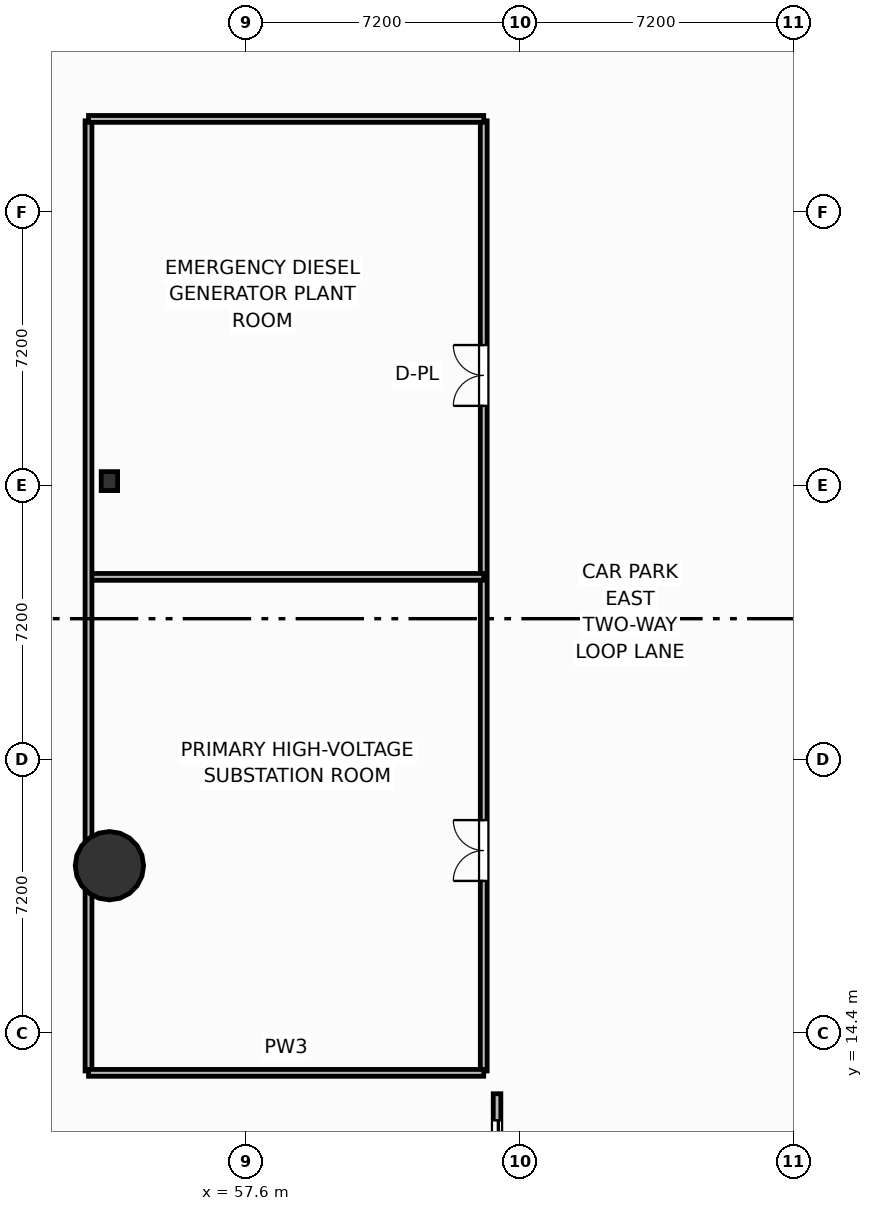
"""IFC4 building model, lengths in metres.
Left out: names, types, materials, properties, quantities, classifications, styles, units other than length and angle.
Written with IfcOpenShell. Run it as: python <this file> out.ifc"""

import sys

from ifc_helpers import new_model, si_unit, direction, frame, frame_2d, origin, origin_2d, place, context, subcontext, project, spatial, rectangle, circle, i_section, extrude, element, fill, save


model = new_model("IFC4")
c1 = context("Model", 3, precision=1e-05, world=origin(), true_north=direction((0.0, 1.0)))
c2 = subcontext(c1, "Body", "Model", "MODEL_VIEW")
j1 = project(units=[si_unit("LENGTHUNIT", "METRE"), si_unit("PLANEANGLEUNIT", "RADIAN")], contexts=[c1])
p1 = place(None, origin())
s1 = spatial("IfcSite", under=j1, at=p1, CompositionType="ELEMENT")
p2 = place(p1, origin())
s2 = spatial("IfcBuilding", under=s1, at=p2, CompositionType="ELEMENT")
p3 = place(p2, frame((0.0, 0.0, -4.5)))
s3 = spatial("IfcBuildingStorey", under=s2, at=p3, CompositionType="ELEMENT", Elevation=-4.5)
p4 = place(p3, frame((54.0, 28.92, 0.0), z_axis=(0.0, 0.0, 1.0), x_axis=(1.0, 0.0, 0.0)))
e1 = element("IfcColumn", 1, at=p4, inside=s3, PredefinedType="COLUMN", context=c2, shape_type="SweptSolid", body=[
    extrude(i_section(OverallWidth=0.432, OverallDepth=0.498, WebThickness=0.056, FlangeThickness=0.089, FilletRadius=0.025, at=origin_2d()), origin(), (0.0, 0.0, 1.0), 4.5),
])
p5 = place(p3, frame((54.0, 18.8, 0.0), z_axis=(0.0, 0.0, 1.0), x_axis=(1.0, 0.0, 0.0)))
e2 = element("IfcColumn", 2, at=p5, inside=s3, PredefinedType="COLUMN", context=c2, shape_type="SweptSolid", body=[
    extrude(circle(Radius=0.9, at=origin_2d()), origin(), (0.0, 0.0, 1.0), 4.5),
])
p6 = place(p3, frame((64.2, 6.2, 0.0), z_axis=(0.0, 0.0, 1.0), x_axis=(0.0, 1.0, 0.0)))
e3 = element("IfcWall", 3, at=p6, inside=s3, PredefinedType="PARTITIONING", context=c2, shape_type="SweptSolid", body=[
    extrude(rectangle(XDim=6.6, YDim=0.2, at=frame_2d((3.3, 0.0))), origin(), (0.0, 0.0, 1.0), 4.18),
])
p7 = place(p6, frame((0.7, 0.0, 0.0)))
e4 = element("IfcOpeningElement", 4, at=p7, cuts=e3, PredefinedType="OPENING", context=c2, shape_type="SweptSolid", body=[
    extrude(rectangle(XDim=5.2, YDim=2.8, at=frame_2d((2.6, 1.4))), frame((0.0, 0.11, 0.0), z_axis=(0.0, -1.0, 0.0), x_axis=(1.0, 0.0, 0.0)), (0.0, 0.0, 1.0), 0.22),
])
p8 = place(p3, frame((63.85, 13.4, 0.0), z_axis=(0.0, 0.0, 1.0), x_axis=(0.0, 1.0, 0.0)))
e5 = element("IfcWall", 5, at=p8, inside=s3, PredefinedType="PARTITIONING", context=c2, shape_type="SweptSolid", body=[
    extrude(rectangle(XDim=25.0, YDim=0.18, at=frame_2d((12.5, 0.0))), origin(), (0.0, 0.0, 1.0), 4.18),
])
p9 = place(p8, frame((5.0, 0.0, 0.0)))
e6 = element("IfcOpeningElement", 6, at=p9, cuts=e5, PredefinedType="OPENING", context=c2, shape_type="SweptSolid", body=[
    extrude(rectangle(XDim=1.6, YDim=2.05, at=frame_2d((0.8, 1.025))), frame((0.0, 0.1, 0.0), z_axis=(0.0, -1.0, 0.0), x_axis=(1.0, 0.0, 0.0)), (0.0, 0.0, 1.0), 0.2),
])
p10 = place(p8, frame((17.5, 0.0, 0.0)))
e7 = element("IfcOpeningElement", 7, at=p10, cuts=e5, PredefinedType="OPENING", context=c2, shape_type="SweptSolid", body=[
    extrude(rectangle(XDim=1.6, YDim=2.05, at=frame_2d((0.8, 1.025))), frame((0.0, 0.1, 0.0), z_axis=(0.0, -1.0, 0.0), x_axis=(1.0, 0.0, 0.0)), (0.0, 0.0, 1.0), 0.2),
])
p11 = place(p3, frame((53.45, 26.4, 0.0), z_axis=(0.0, 0.0, 1.0), x_axis=(1.0, 0.0, 0.0)))
e8 = element("IfcWall", 8, at=p11, inside=s3, PredefinedType="PARTITIONING", context=c2, shape_type="SweptSolid", body=[
    extrude(rectangle(XDim=10.4, YDim=0.18, at=frame_2d((5.2, 0.0))), origin(), (0.0, 0.0, 1.0), 4.18),
])
p12 = place(p3, frame((53.45, 13.4, 0.0), z_axis=(0.0, 0.0, 1.0), x_axis=(0.0, 1.0, 0.0)))
e9 = element("IfcWall", 9, at=p12, inside=s3, PredefinedType="PARTITIONING", context=c2, shape_type="SweptSolid", body=[
    extrude(rectangle(XDim=25.0, YDim=0.18, at=frame_2d((12.5, 0.0))), origin(), (0.0, 0.0, 1.0), 4.18),
])
for number, where, z_axis, x_axis in (
    (10, (53.45, 13.35, 0.0), (0.0, 0.0, 1.0), (1.0, 0.0, 0.0)),
    (11, (53.45, 38.45, 0.0), (0.0, 0.0, 1.0), (1.0, 0.0, 0.0)),
):
    element("IfcWall", number, at=place(p3, frame(where, z_axis=z_axis, x_axis=x_axis)), inside=s3, PredefinedType="PARTITIONING", context=c2, shape_type="SweptSolid", body=[
        extrude(rectangle(XDim=10.4, YDim=0.18, at=frame_2d((5.2, 0.0))), origin(), (0.0, 0.0, 1.0), 4.18),
    ])
p13 = place(p7, origin())
e12 = element("IfcDoor", 12, at=p13, inside=s3, OperationType="SLIDING_TO_LEFT", PredefinedType="GATE", context=c2, shape_type="SweptSolid", body=[
    extrude(rectangle(XDim=5.2, YDim=2.8, at=frame_2d((2.6, 1.4))), frame((0.0, 0.025, 0.0), z_axis=(0.0, -1.0, 0.0), x_axis=(1.0, 0.0, 0.0)), (0.0, 0.0, 1.0), 0.05),
])
fill(e4, e12)
p14 = place(p9, origin())
e13 = element("IfcDoor", 13, at=p14, inside=s3, OperationType="DOUBLE_DOOR_SINGLE_SWING", PredefinedType="DOOR", context=c2, shape_type="SweptSolid", body=[
    extrude(rectangle(XDim=1.6, YDim=2.05, at=frame_2d((0.8, 1.025))), frame((0.0, 0.025, 0.0), z_axis=(0.0, -1.0, 0.0), x_axis=(1.0, 0.0, 0.0)), (0.0, 0.0, 1.0), 0.05),
])
fill(e6, e13)
p15 = place(p10, origin())
e14 = element("IfcDoor", 14, at=p15, inside=s3, OperationType="DOUBLE_DOOR_SINGLE_SWING", PredefinedType="DOOR", context=c2, shape_type="SweptSolid", body=[
    extrude(rectangle(XDim=1.6, YDim=2.05, at=frame_2d((0.8, 1.025))), frame((0.0, 0.025, 0.0), z_axis=(0.0, -1.0, 0.0), x_axis=(1.0, 0.0, 0.0)), (0.0, 0.0, 1.0), 0.05),
])
fill(e7, e14)
save(model, sys.argv[1])
